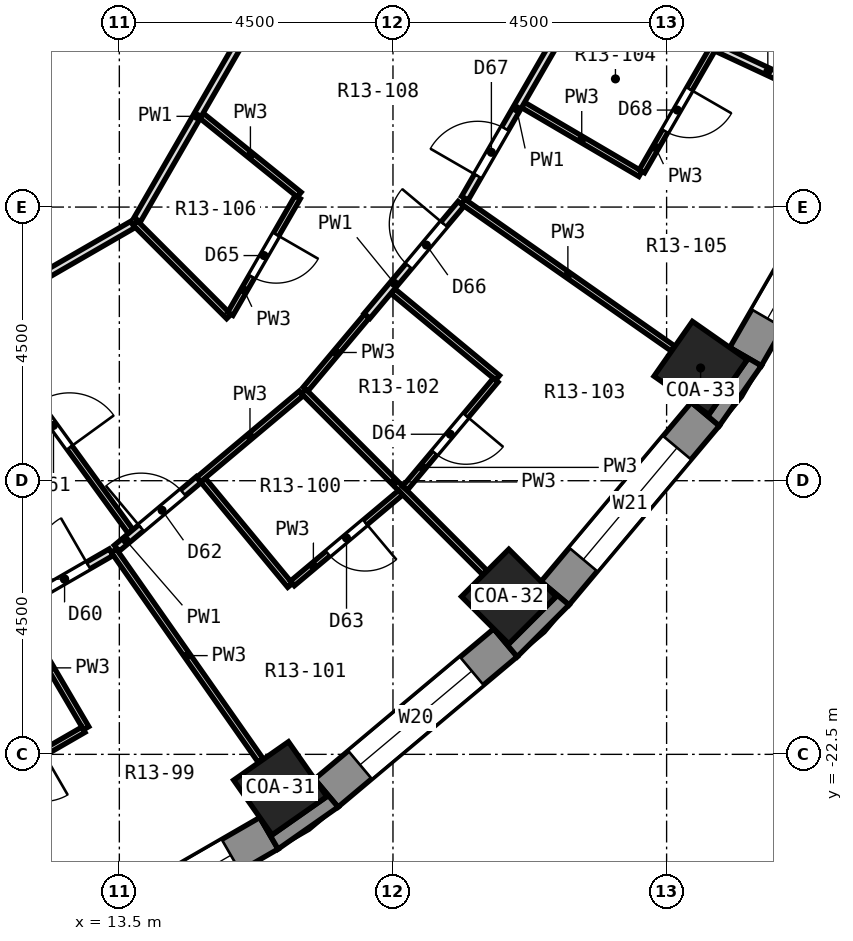
"""IFC4 building model, lengths in metres.
Left out: names, types, materials, properties, quantities, classifications, styles, units other than length and angle.
Written with IfcOpenShell. Run it as: python <this file> out.ifc"""

import sys

from ifc_helpers import new_model, si_unit, direction, frame, frame_2d, origin, origin_2d, place, context, subcontext, project, spatial, polyline, rectangle, outline, extrude, element, fill, save


model = new_model("IFC4")
c1 = context("Model", 3, precision=1e-05, world=origin(), true_north=direction((0.0, 1.0)))
c2 = subcontext(c1, "Body", "Model", "MODEL_VIEW")
j1 = project(units=[si_unit("LENGTHUNIT", "METRE"), si_unit("PLANEANGLEUNIT", "RADIAN")], contexts=[c1])
p1 = place(None, origin())
s1 = spatial("IfcSite", under=j1, at=p1, CompositionType="ELEMENT")
p2 = place(p1, origin())
s2 = spatial("IfcBuilding", under=s1, at=p2, CompositionType="ELEMENT")
p3 = place(p2, frame((0.0, 0.0, 65.9)))
s3 = spatial("IfcBuildingStorey", under=s2, at=p3, CompositionType="ELEMENT", Elevation=65.9)
for number, where, z_axis, x_axis in (
    (1, (16.146, -23.059, 0.0), (0.0, 0.0, 1.0), (0.574, -0.819, 0.0)),
    (2, (19.905, -19.905, 0.0), (0.0, 0.0, 1.0), (0.707, -0.707, 0.0)),
    (3, (23.059, -16.146, 0.0), (0.0, 0.0, 1.0), (0.819, -0.574, 0.0)),
):
    element("IfcColumn", number, at=place(p3, frame(where, z_axis=z_axis, x_axis=x_axis)), inside=s3, PredefinedType="COLUMN", context=c2, shape_type="SweptSolid", body=[
        extrude(rectangle(XDim=1.1, YDim=1.1, at=origin_2d()), origin(), (0.0, 0.0, 1.0), 3.3),
    ])
p4 = place(p3, frame((12.63, -25.721, 0.0), z_axis=(0.0, 0.0, 1.0), x_axis=(0.86603124159, 0.499989888488, 0.0)))
e4 = element("IfcWall", 4, at=p4, inside=s3, PredefinedType="SOLIDWALL", context=c2, shape_type="SweptSolid", body=[
    extrude(rectangle(XDim=3.846, YDim=0.6, at=frame_2d((1.923, 0.0))), origin(), (0.0, 0.0, 1.0), 2.75),
])
p5 = place(p4, frame((0.723, 0.0, 0.9)))
e5 = element("IfcOpeningElement", 5, at=p5, cuts=e4, PredefinedType="OPENING", context=c2, shape_type="SweptSolid", body=[
    extrude(rectangle(XDim=2.4, YDim=1.8, at=frame_2d((1.2, 0.9))), frame((0.0, 0.312, 0.0), z_axis=(0.0, -1.0, 0.0), x_axis=(1.0, 0.0, 0.0)), (0.0, 0.0, 1.0), 0.624),
])
p6 = place(p3, frame((16.904, -23.137, 0.0), z_axis=(0.0, 0.0, 1.0), x_axis=(0.766026164483, 0.642809392687, 0.0)))
e6 = element("IfcWall", 6, at=p6, inside=s3, PredefinedType="SOLIDWALL", context=c2, shape_type="SweptSolid", body=[
    extrude(rectangle(XDim=3.846, YDim=0.6, at=frame_2d((1.923, 0.0))), origin(), (0.0, 0.0, 1.0), 2.75),
])
p7 = place(p6, frame((0.723, 0.0, 0.9)))
e7 = element("IfcOpeningElement", 7, at=p7, cuts=e6, PredefinedType="OPENING", context=c2, shape_type="SweptSolid", body=[
    extrude(rectangle(XDim=2.4, YDim=1.8, at=frame_2d((1.2, 0.9))), frame((0.0, 0.312, 0.0), z_axis=(0.0, -1.0, 0.0), x_axis=(1.0, 0.0, 0.0)), (0.0, 0.0, 1.0), 0.624),
])
p8 = place(p3, frame((20.665, -19.85, 0.0), z_axis=(0.0, 0.0, 1.0), x_axis=(0.642809392687, 0.766026164483, 0.0)))
e8 = element("IfcWall", 8, at=p8, inside=s3, PredefinedType="SOLIDWALL", context=c2, shape_type="SweptSolid", body=[
    extrude(rectangle(XDim=3.846, YDim=0.6, at=frame_2d((1.923, 0.0))), origin(), (0.0, 0.0, 1.0), 2.75),
])
p9 = place(p8, frame((0.723, 0.0, 0.9)))
e9 = element("IfcOpeningElement", 9, at=p9, cuts=e8, PredefinedType="OPENING", context=c2, shape_type="SweptSolid", body=[
    extrude(rectangle(XDim=2.4, YDim=1.8, at=frame_2d((1.2, 0.9))), frame((0.0, 0.312, 0.0), z_axis=(0.0, -1.0, 0.0), x_axis=(1.0, 0.0, 0.0)), (0.0, 0.0, 1.0), 0.624),
])
p10 = place(p3, frame((23.798, -15.96, 0.0), z_axis=(0.0, 0.0, 1.0), x_axis=(0.499989888488, 0.86603124159, 0.0)))
e10 = element("IfcWall", 10, at=p10, inside=s3, PredefinedType="SOLIDWALL", context=c2, shape_type="SweptSolid", body=[
    extrude(rectangle(XDim=3.846, YDim=0.6, at=frame_2d((1.923, 0.0))), origin(), (0.0, 0.0, 1.0), 2.75),
])
p11 = place(p10, frame((0.723, 0.0, 0.9)))
e11 = element("IfcOpeningElement", 11, at=p11, cuts=e10, PredefinedType="OPENING", context=c2, shape_type="SweptSolid", body=[
    extrude(rectangle(XDim=2.4, YDim=1.8, at=frame_2d((1.2, 0.9))), frame((0.0, 0.312, 0.0), z_axis=(0.0, -1.0, 0.0), x_axis=(1.0, 0.0, 0.0)), (0.0, 0.0, 1.0), 0.624),
])
p12 = place(p3, origin())
e12 = element("IfcWall", 12, at=p12, inside=s3, PredefinedType="SOLIDWALL", context=c2, shape_type="SweptSolid", body=[
    extrude(outline(polyline([(16.11, -24.058), (17.097, -23.367), (16.711, -22.907), (16.912, -23.194), (16.011, -23.825), (15.81, -23.538), (16.11, -24.058)])), origin(), (0.0, 0.0, 1.0), 2.75),
])
p13 = place(p3, origin())
e13 = element("IfcWall", 13, at=p13, inside=s3, PredefinedType="SOLIDWALL", context=c2, shape_type="SweptSolid", body=[
    extrude(outline(polyline([(20.895, -20.043), (20.435, -19.657), (20.683, -19.905), (19.905, -20.683), (19.657, -20.435), (20.043, -20.895), (20.895, -20.043)])), origin(), (0.0, 0.0, 1.0), 2.75),
])
p14 = place(p3, origin())
e14 = element("IfcWall", 14, at=p14, inside=s3, PredefinedType="SOLIDWALL", context=c2, shape_type="SweptSolid", body=[
    extrude(outline(polyline([(23.367, -17.097), (24.058, -16.11), (23.538, -15.81), (23.825, -16.011), (23.194, -16.912), (22.907, -16.711), (23.367, -17.097)])), origin(), (0.0, 0.0, 1.0), 2.75),
])
p15 = place(p3, frame((11.79, -20.086, 0.0), z_axis=(0.0, 0.0, 1.0), x_axis=(0.506212585002, -0.862408730699, 0.0)))
e15 = element("IfcWall", 15, at=p15, inside=s3, PredefinedType="PARTITIONING", context=c2, shape_type="SweptSolid", body=[
    extrude(rectangle(XDim=2.3, YDim=0.1, at=frame_2d((1.15, 0.0))), origin(), (0.0, 0.0, 1.0), 2.75),
])
p16 = place(p3, frame((13.409, -19.151, 0.0), z_axis=(0.0, 0.0, 1.0), x_axis=(0.573446781639, -0.819242814206, 0.0)))
e16 = element("IfcWall", 16, at=p16, inside=s3, PredefinedType="PARTITIONING", context=c2, shape_type="SweptSolid", body=[
    extrude(rectangle(XDim=4.211, YDim=0.1, at=frame_2d((2.106, 0.0))), origin(), (0.0, 0.0, 1.0), 2.75),
])
p17 = place(p3, frame((11.148, -15.344, 0.0), z_axis=(0.0, 0.0, 1.0), x_axis=(0.587899330934, -0.8089340991, 0.0)))
e17 = element("IfcWall", 17, at=p17, inside=s3, PredefinedType="PARTITIONING", context=c2, shape_type="SweptSolid", body=[
    extrude(rectangle(XDim=4.318, YDim=0.1, at=frame_2d((2.159, 0.0))), origin(), (0.0, 0.0, 1.0), 2.75),
])
p18 = place(p17, frame((1.709, 0.0, 0.0)))
e18 = element("IfcOpeningElement", 18, at=p18, cuts=e17, PredefinedType="OPENING", context=c2, shape_type="SweptSolid", body=[
    extrude(rectangle(XDim=0.9, YDim=2.1, at=frame_2d((0.45, 1.05))), frame((0.0, 0.062, 0.0), z_axis=(0.0, -1.0, 0.0), x_axis=(1.0, 0.0, 0.0)), (0.0, 0.0, 1.0), 0.124),
])
p19 = place(p3, frame((14.874, -17.988, 0.0), z_axis=(0.0, 0.0, 1.0), x_axis=(0.637512192465, -0.770440266639, 0.0)))
e19 = element("IfcWall", 19, at=p19, inside=s3, PredefinedType="PARTITIONING", context=c2, shape_type="SweptSolid", body=[
    extrude(rectangle(XDim=2.25, YDim=0.1, at=frame_2d((1.125, 0.0))), origin(), (0.0, 0.0, 1.0), 2.75),
])
p20 = place(p3, frame((13.763, -13.763, 0.0), z_axis=(0.0, 0.0, 1.0), x_axis=(0.707106781187, -0.707106781187, 0.0)))
e20 = element("IfcWall", 20, at=p20, inside=s3, PredefinedType="PARTITIONING", context=c2, shape_type="SweptSolid", body=[
    extrude(rectangle(XDim=2.174, YDim=0.1, at=frame_2d((1.087, 0.0))), origin(), (0.0, 0.0, 1.0), 2.75),
])
p21 = place(p3, frame((16.531, -16.531, 0.0), z_axis=(0.0, 0.0, 1.0), x_axis=(0.707106781187, -0.707106781187, 0.0)))
e21 = element("IfcWall", 21, at=p21, inside=s3, PredefinedType="PARTITIONING", context=c2, shape_type="SweptSolid", body=[
    extrude(rectangle(XDim=4.212, YDim=0.1, at=frame_2d((2.106, 0.0))), origin(), (0.0, 0.0, 1.0), 2.75),
])
p22 = place(p3, frame((17.997, -14.882, 0.0), z_axis=(0.0, 0.0, 1.0), x_axis=(0.770479328971, -0.637464982276, 0.0)))
e22 = element("IfcWall", 22, at=p22, inside=s3, PredefinedType="PARTITIONING", context=c2, shape_type="SweptSolid", body=[
    extrude(rectangle(XDim=2.237, YDim=0.1, at=frame_2d((1.119, 0.0))), origin(), (0.0, 0.0, 1.0), 2.75),
])
p23 = place(p3, frame((14.853, -11.999, 0.0), z_axis=(0.0, 0.0, 1.0), x_axis=(0.777974546864, -0.628295793741, 0.0)))
e23 = element("IfcWall", 23, at=p23, inside=s3, PredefinedType="PARTITIONING", context=c2, shape_type="SweptSolid", body=[
    extrude(rectangle(XDim=2.063, YDim=0.1, at=frame_2d((1.032, 0.0))), origin(), (0.0, 0.0, 1.0), 2.75),
])
p24 = place(p3, frame((19.151, -13.409, 0.0), z_axis=(0.0, 0.0, 1.0), x_axis=(0.819242814206, -0.573446781639, 0.0)))
e24 = element("IfcWall", 24, at=p24, inside=s3, PredefinedType="PARTITIONING", context=c2, shape_type="SweptSolid", body=[
    extrude(rectangle(XDim=4.211, YDim=0.1, at=frame_2d((2.106, 0.0))), origin(), (0.0, 0.0, 1.0), 2.75),
])
p25 = place(p3, frame((20.14, -11.822, 0.0), z_axis=(0.0, 0.0, 1.0), x_axis=(0.862374352329, -0.506271149134, 0.0)))
e25 = element("IfcWall", 25, at=p25, inside=s3, PredefinedType="PARTITIONING", context=c2, shape_type="SweptSolid", body=[
    extrude(rectangle(XDim=2.237, YDim=0.1, at=frame_2d((1.119, 0.0))), origin(), (0.0, 0.0, 1.0), 2.75),
])
p26 = place(p3, frame((23.325, -10.879, 0.0), z_axis=(0.0, 0.0, 1.0), x_axis=(0.906348054162, -0.422531897869, 0.0)))
e26 = element("IfcWall", 26, at=p26, inside=s3, PredefinedType="PARTITIONING", context=c2, shape_type="SweptSolid", body=[
    extrude(rectangle(XDim=1.853, YDim=0.125, at=frame_2d((0.926, 0.0))), origin(), (0.0, 0.0, 1.0), 2.75),
])
p27 = place(p3, frame((10.899, -23.256, 0.0), z_axis=(0.0, 0.0, 1.0), x_axis=(0.865852932048, 0.500298610895, 0.0)))
e27 = element("IfcWall", 27, at=p27, inside=s3, PredefinedType="PARTITIONING", context=c2, shape_type="SweptSolid", body=[
    extrude(rectangle(XDim=2.323, YDim=0.1, at=frame_2d((1.161, 0.0))), origin(), (0.0, 0.0, 1.0), 2.75),
])
p28 = place(p27, frame((0.761, 0.0, 0.0)))
e28 = element("IfcOpeningElement", 28, at=p28, cuts=e27, PredefinedType="OPENING", context=c2, shape_type="SweptSolid", body=[
    extrude(rectangle(XDim=0.8, YDim=2.1, at=frame_2d((0.4, 1.05))), frame((0.0, 0.062, 0.0), z_axis=(0.0, -1.0, 0.0), x_axis=(1.0, 0.0, 0.0)), (0.0, 0.0, 1.0), 0.124),
])
p29 = place(p3, frame((11.833, -20.061, 0.0), z_axis=(0.0, 0.0, 1.0), x_axis=(0.865967311171, 0.500100605862, 0.0)))
e29 = element("IfcWall", 29, at=p29, inside=s3, PredefinedType="PARTITIONING", context=c2, shape_type="SweptSolid", body=[
    extrude(rectangle(XDim=1.77, YDim=0.125, at=frame_2d((0.885, 0.0))), origin(), (0.0, 0.0, 1.0), 2.75),
])
p30 = place(p29, frame((0.435, 0.0, 0.0)))
e30 = element("IfcOpeningElement", 30, at=p30, cuts=e29, PredefinedType="OPENING", context=c2, shape_type="SweptSolid", body=[
    extrude(rectangle(XDim=0.9, YDim=2.1, at=frame_2d((0.45, 1.05))), frame((0.0, 0.074, 0.0), z_axis=(0.0, -1.0, 0.0), x_axis=(1.0, 0.0, 0.0)), (0.0, 0.0, 1.0), 0.149),
])
p31 = place(p3, frame((5.102, -18.762, 0.0), z_axis=(0.0, 0.0, 1.0), x_axis=(0.866071189182, 0.499920688979, 0.0)))
e31 = element("IfcWall", 31, at=p31, inside=s3, PredefinedType="PARTITIONING", context=c2, shape_type="SweptSolid", body=[
    extrude(rectangle(XDim=9.95, YDim=0.125, at=frame_2d((4.975, 0.0))), origin(), (0.0, 0.0, 1.0), 2.75),
])
p32 = place(p31, frame((2.932, 0.0, 0.0)))
e32 = element("IfcOpeningElement", 32, at=p32, cuts=e31, PredefinedType="OPENING", context=c2, shape_type="SweptSolid", body=[
    extrude(rectangle(XDim=1.0, YDim=2.1, at=frame_2d((0.5, 1.05))), frame((0.0, 0.074, 0.0), z_axis=(0.0, -1.0, 0.0), x_axis=(1.0, 0.0, 0.0)), (0.0, 0.0, 1.0), 0.149),
])
p33 = place(p3, frame((13.457, -19.111, 0.0), z_axis=(0.0, 0.0, 1.0), x_axis=(0.766590701723, 0.642136041686, 0.0)))
e33 = element("IfcWall", 33, at=p33, inside=s3, PredefinedType="PARTITIONING", context=c2, shape_type="SweptSolid", body=[
    extrude(rectangle(XDim=1.758, YDim=0.125, at=frame_2d((0.879, 0.0))), origin(), (0.0, 0.0, 1.0), 2.75),
])
p34 = place(p33, frame((0.523, 0.0, 0.0)))
e34 = element("IfcOpeningElement", 34, at=p34, cuts=e33, PredefinedType="OPENING", context=c2, shape_type="SweptSolid", body=[
    extrude(rectangle(XDim=0.9, YDim=2.1, at=frame_2d((0.45, 1.05))), frame((0.0, 0.074, 0.0), z_axis=(0.0, -1.0, 0.0), x_axis=(1.0, 0.0, 0.0)), (0.0, 0.0, 1.0), 0.149),
])
p35 = place(p3, frame((16.346, -19.689, 0.0), z_axis=(0.0, 0.0, 1.0), x_axis=(0.766106399864, 0.642713765286, 0.0)))
e35 = element("IfcWall", 35, at=p35, inside=s3, PredefinedType="PARTITIONING", context=c2, shape_type="SweptSolid", body=[
    extrude(rectangle(XDim=2.323, YDim=0.1, at=frame_2d((1.161, 0.0))), origin(), (0.0, 0.0, 1.0), 2.75),
])
p36 = place(p35, frame((0.761, 0.0, 0.0)))
e36 = element("IfcOpeningElement", 36, at=p36, cuts=e35, PredefinedType="OPENING", context=c2, shape_type="SweptSolid", body=[
    extrude(rectangle(XDim=0.8, YDim=2.1, at=frame_2d((0.4, 1.05))), frame((0.0, 0.062, 0.0), z_axis=(0.0, -1.0, 0.0), x_axis=(1.0, 0.0, 0.0)), (0.0, 0.0, 1.0), 0.124),
])
p37 = place(p3, frame((14.804, -17.981, 0.0), z_axis=(0.0, 0.0, 1.0), x_axis=(0.765874949637, 0.642989550085, 0.0)))
e37 = element("IfcWall", 37, at=p37, inside=s3, PredefinedType="PARTITIONING", context=c2, shape_type="SweptSolid", body=[
    extrude(rectangle(XDim=2.205, YDim=0.1, at=frame_2d((1.103, 0.0))), origin(), (0.0, 0.0, 1.0), 2.75),
])
p38 = place(p3, frame((18.196, -18.126, 0.0), z_axis=(0.0, 0.0, 1.0), x_axis=(0.642713765286, 0.766106399864, 0.0)))
e38 = element("IfcWall", 38, at=p38, inside=s3, PredefinedType="PARTITIONING", context=c2, shape_type="SweptSolid", body=[
    extrude(rectangle(XDim=2.323, YDim=0.1, at=frame_2d((1.161, 0.0))), origin(), (0.0, 0.0, 1.0), 2.75),
])
p39 = place(p38, frame((0.761, 0.0, 0.0)))
e39 = element("IfcOpeningElement", 39, at=p39, cuts=e38, PredefinedType="OPENING", context=c2, shape_type="SweptSolid", body=[
    extrude(rectangle(XDim=0.8, YDim=2.1, at=frame_2d((0.4, 1.05))), frame((0.0, 0.062, 0.0), z_axis=(0.0, -1.0, 0.0), x_axis=(1.0, 0.0, 0.0)), (0.0, 0.0, 1.0), 0.124),
])
p40 = place(p3, frame((16.563, -16.493, 0.0), z_axis=(0.0, 0.0, 1.0), x_axis=(0.642980448463, 0.765882590802, 0.0)))
e40 = element("IfcWall", 40, at=p40, inside=s3, PredefinedType="PARTITIONING", context=c2, shape_type="SweptSolid", body=[
    extrude(rectangle(XDim=1.569, YDim=0.1, at=frame_2d((0.785, 0.0))), origin(), (0.0, 0.0, 1.0), 2.75),
])
p41 = place(p3, frame((17.573, -15.291, 0.0), z_axis=(0.0, 0.0, 1.0), x_axis=(0.642616104492, 0.766188320354, 0.0)))
e41 = element("IfcWall", 41, at=p41, inside=s3, PredefinedType="PARTITIONING", context=c2, shape_type="SweptSolid", body=[
    extrude(rectangle(XDim=2.406, YDim=0.125, at=frame_2d((1.203, 0.0))), origin(), (0.0, 0.0, 1.0), 2.75),
])
p42 = place(p41, frame((1.071, 0.0, 0.0)))
e42 = element("IfcOpeningElement", 42, at=p42, cuts=e41, PredefinedType="OPENING", context=c2, shape_type="SweptSolid", body=[
    extrude(rectangle(XDim=0.9, YDim=2.1, at=frame_2d((0.45, 1.05))), frame((0.0, 0.074, 0.0), z_axis=(0.0, -1.0, 0.0), x_axis=(1.0, 0.0, 0.0)), (0.0, 0.0, 1.0), 0.149),
])
p43 = place(p3, frame((22.094, -12.911, 0.0), z_axis=(0.0, 0.0, 1.0), x_axis=(0.500223263977, 0.865896463889, 0.0)))
e43 = element("IfcWall", 43, at=p43, inside=s3, PredefinedType="PARTITIONING", context=c2, shape_type="SweptSolid", body=[
    extrude(rectangle(XDim=2.321, YDim=0.1, at=frame_2d((1.16, 0.0))), origin(), (0.0, 0.0, 1.0), 2.75),
])
p44 = place(p43, frame((0.761, 0.0, 0.0)))
e44 = element("IfcOpeningElement", 44, at=p44, cuts=e43, PredefinedType="OPENING", context=c2, shape_type="SweptSolid", body=[
    extrude(rectangle(XDim=0.8, YDim=2.1, at=frame_2d((0.4, 1.05))), frame((0.0, 0.062, 0.0), z_axis=(0.0, -1.0, 0.0), x_axis=(1.0, 0.0, 0.0)), (0.0, 0.0, 1.0), 0.124),
])
p45 = place(p3, frame((19.182, -13.355, 0.0), z_axis=(0.0, 0.0, 1.0), x_axis=(0.500092867575, 0.865971780025, 0.0)))
e45 = element("IfcWall", 45, at=p45, inside=s3, PredefinedType="PARTITIONING", context=c2, shape_type="SweptSolid", body=[
    extrude(rectangle(XDim=2.929, YDim=0.125, at=frame_2d((1.464, 0.0))), origin(), (0.0, 0.0, 1.0), 2.75),
])
p46 = place(p45, frame((0.422, 0.0, 0.0)))
e46 = element("IfcOpeningElement", 46, at=p46, cuts=e45, PredefinedType="OPENING", context=c2, shape_type="SweptSolid", body=[
    extrude(rectangle(XDim=0.9, YDim=2.1, at=frame_2d((0.45, 1.05))), frame((0.0, 0.074, 0.0), z_axis=(0.0, -1.0, 0.0), x_axis=(1.0, 0.0, 0.0)), (0.0, 0.0, 1.0), 0.149),
])
p47 = place(p3, frame((15.325, -15.257, 0.0), z_axis=(0.0, 0.0, 1.0), x_axis=(0.500228022419, 0.865893714948, 0.0)))
e47 = element("IfcWall", 47, at=p47, inside=s3, PredefinedType="PARTITIONING", context=c2, shape_type="SweptSolid", body=[
    extrude(rectangle(XDim=2.215, YDim=0.1, at=frame_2d((1.108, 0.0))), origin(), (0.0, 0.0, 1.0), 2.75),
])
p48 = place(p47, frame((0.708, 0.0, 0.0)))
e48 = element("IfcOpeningElement", 48, at=p48, cuts=e47, PredefinedType="OPENING", context=c2, shape_type="SweptSolid", body=[
    extrude(rectangle(XDim=0.8, YDim=2.1, at=frame_2d((0.4, 1.05))), frame((0.0, 0.062, 0.0), z_axis=(0.0, -1.0, 0.0), x_axis=(1.0, 0.0, 0.0)), (0.0, 0.0, 1.0), 0.124),
])
p49 = place(p3, frame((13.794, -13.709, 0.0), z_axis=(0.0, 0.0, 1.0), x_axis=(0.499916150712, 0.866073808781, 0.0)))
e49 = element("IfcWall", 49, at=p49, inside=s3, PredefinedType="PARTITIONING", context=c2, shape_type="SweptSolid", body=[
    extrude(rectangle(XDim=3.928, YDim=0.125, at=frame_2d((1.964, 0.0))), origin(), (0.0, 0.0, 1.0), 2.75),
])
p50 = place(p5, origin())
e50 = element("IfcWindow", 50, at=p50, inside=s3, PartitioningType="SINGLE_PANEL", PredefinedType="WINDOW", context=c2, shape_type="SweptSolid", body=[
    extrude(rectangle(XDim=2.4, YDim=1.8, at=frame_2d((1.2, 0.9))), frame((0.0, 0.18, 0.0), z_axis=(0.0, -1.0, 0.0), x_axis=(1.0, 0.0, 0.0)), (0.0, 0.0, 1.0), 0.06),
])
fill(e5, e50)
p51 = place(p7, origin())
e51 = element("IfcWindow", 51, at=p51, inside=s3, PartitioningType="SINGLE_PANEL", PredefinedType="WINDOW", context=c2, shape_type="SweptSolid", body=[
    extrude(rectangle(XDim=2.4, YDim=1.8, at=frame_2d((1.2, 0.9))), frame((0.0, 0.18, 0.0), z_axis=(0.0, -1.0, 0.0), x_axis=(1.0, 0.0, 0.0)), (0.0, 0.0, 1.0), 0.06),
])
fill(e7, e51)
p52 = place(p9, origin())
e52 = element("IfcWindow", 52, at=p52, inside=s3, PartitioningType="SINGLE_PANEL", PredefinedType="WINDOW", context=c2, shape_type="SweptSolid", body=[
    extrude(rectangle(XDim=2.4, YDim=1.8, at=frame_2d((1.2, 0.9))), frame((0.0, 0.18, 0.0), z_axis=(0.0, -1.0, 0.0), x_axis=(1.0, 0.0, 0.0)), (0.0, 0.0, 1.0), 0.06),
])
fill(e9, e52)
p53 = place(p11, origin())
e53 = element("IfcWindow", 53, at=p53, inside=s3, PartitioningType="SINGLE_PANEL", PredefinedType="WINDOW", context=c2, shape_type="SweptSolid", body=[
    extrude(rectangle(XDim=2.4, YDim=1.8, at=frame_2d((1.2, 0.9))), frame((0.0, 0.18, 0.0), z_axis=(0.0, -1.0, 0.0), x_axis=(1.0, 0.0, 0.0)), (0.0, 0.0, 1.0), 0.06),
])
fill(e11, e53)
p54 = place(p30, origin())
e54 = element("IfcDoor", 54, at=p54, inside=s3, OperationType="SINGLE_SWING_RIGHT", PredefinedType="DOOR", context=c2, shape_type="SweptSolid", body=[
    extrude(rectangle(XDim=0.9, YDim=2.1, at=frame_2d((0.45, 1.05))), frame((0.0, 0.025, 0.0), z_axis=(0.0, -1.0, 0.0), x_axis=(1.0, 0.0, 0.0)), (0.0, 0.0, 1.0), 0.05),
])
fill(e30, e54)
p55 = place(p18, origin())
e55 = element("IfcDoor", 55, at=p55, inside=s3, OperationType="SINGLE_SWING_RIGHT", PredefinedType="DOOR", context=c2, shape_type="SweptSolid", body=[
    extrude(rectangle(XDim=0.9, YDim=2.1, at=frame_2d((0.45, 1.05))), frame((0.0, 0.025, 0.0), z_axis=(0.0, -1.0, 0.0), x_axis=(1.0, 0.0, 0.0)), (0.0, 0.0, 1.0), 0.05),
])
fill(e18, e55)
p56 = place(p34, origin())
e56 = element("IfcDoor", 56, at=p56, inside=s3, OperationType="SINGLE_SWING_LEFT", PredefinedType="DOOR", context=c2, shape_type="SweptSolid", body=[
    extrude(rectangle(XDim=0.9, YDim=2.1, at=frame_2d((0.45, 1.05))), frame((0.0, 0.025, 0.0), z_axis=(0.0, -1.0, 0.0), x_axis=(1.0, 0.0, 0.0)), (0.0, 0.0, 1.0), 0.05),
])
fill(e34, e56)
p57 = place(p36, frame((0.8, 0.0, 0.0), z_axis=(0.0, 0.0, 1.0), x_axis=(-1.0, 0.0, 0.0)))
e57 = element("IfcDoor", 57, at=p57, inside=s3, OperationType="SINGLE_SWING_LEFT", PredefinedType="DOOR", context=c2, shape_type="SweptSolid", body=[
    extrude(rectangle(XDim=0.8, YDim=2.1, at=frame_2d((0.4, 1.05))), frame((0.0, 0.025, 0.0), z_axis=(0.0, -1.0, 0.0), x_axis=(1.0, 0.0, 0.0)), (0.0, 0.0, 1.0), 0.05),
])
fill(e36, e57)
p58 = place(p39, frame((0.8, 0.0, 0.0), z_axis=(0.0, 0.0, 1.0), x_axis=(-1.0, 0.0, 0.0)))
e58 = element("IfcDoor", 58, at=p58, inside=s3, OperationType="SINGLE_SWING_LEFT", PredefinedType="DOOR", context=c2, shape_type="SweptSolid", body=[
    extrude(rectangle(XDim=0.8, YDim=2.1, at=frame_2d((0.4, 1.05))), frame((0.0, 0.025, 0.0), z_axis=(0.0, -1.0, 0.0), x_axis=(1.0, 0.0, 0.0)), (0.0, 0.0, 1.0), 0.05),
])
fill(e39, e58)
p59 = place(p48, frame((0.8, 0.0, 0.0), z_axis=(0.0, 0.0, 1.0), x_axis=(-1.0, 0.0, 0.0)))
e59 = element("IfcDoor", 59, at=p59, inside=s3, OperationType="SINGLE_SWING_LEFT", PredefinedType="DOOR", context=c2, shape_type="SweptSolid", body=[
    extrude(rectangle(XDim=0.8, YDim=2.1, at=frame_2d((0.4, 1.05))), frame((0.0, 0.025, 0.0), z_axis=(0.0, -1.0, 0.0), x_axis=(1.0, 0.0, 0.0)), (0.0, 0.0, 1.0), 0.05),
])
fill(e48, e59)
p60 = place(p42, origin())
e60 = element("IfcDoor", 60, at=p60, inside=s3, OperationType="SINGLE_SWING_RIGHT", PredefinedType="DOOR", context=c2, shape_type="SweptSolid", body=[
    extrude(rectangle(XDim=0.9, YDim=2.1, at=frame_2d((0.45, 1.05))), frame((0.0, 0.025, 0.0), z_axis=(0.0, -1.0, 0.0), x_axis=(1.0, 0.0, 0.0)), (0.0, 0.0, 1.0), 0.05),
])
fill(e42, e60)
p61 = place(p46, origin())
e61 = element("IfcDoor", 61, at=p61, inside=s3, OperationType="SINGLE_SWING_LEFT", PredefinedType="DOOR", context=c2, shape_type="SweptSolid", body=[
    extrude(rectangle(XDim=0.9, YDim=2.1, at=frame_2d((0.45, 1.05))), frame((0.0, 0.025, 0.0), z_axis=(0.0, -1.0, 0.0), x_axis=(1.0, 0.0, 0.0)), (0.0, 0.0, 1.0), 0.05),
])
fill(e46, e61)
p62 = place(p44, frame((0.8, 0.0, 0.0), z_axis=(0.0, 0.0, 1.0), x_axis=(-1.0, 0.0, 0.0)))
e62 = element("IfcDoor", 62, at=p62, inside=s3, OperationType="SINGLE_SWING_LEFT", PredefinedType="DOOR", context=c2, shape_type="SweptSolid", body=[
    extrude(rectangle(XDim=0.8, YDim=2.1, at=frame_2d((0.4, 1.05))), frame((0.0, 0.025, 0.0), z_axis=(0.0, -1.0, 0.0), x_axis=(1.0, 0.0, 0.0)), (0.0, 0.0, 1.0), 0.05),
])
fill(e44, e62)
save(model, sys.argv[1])
